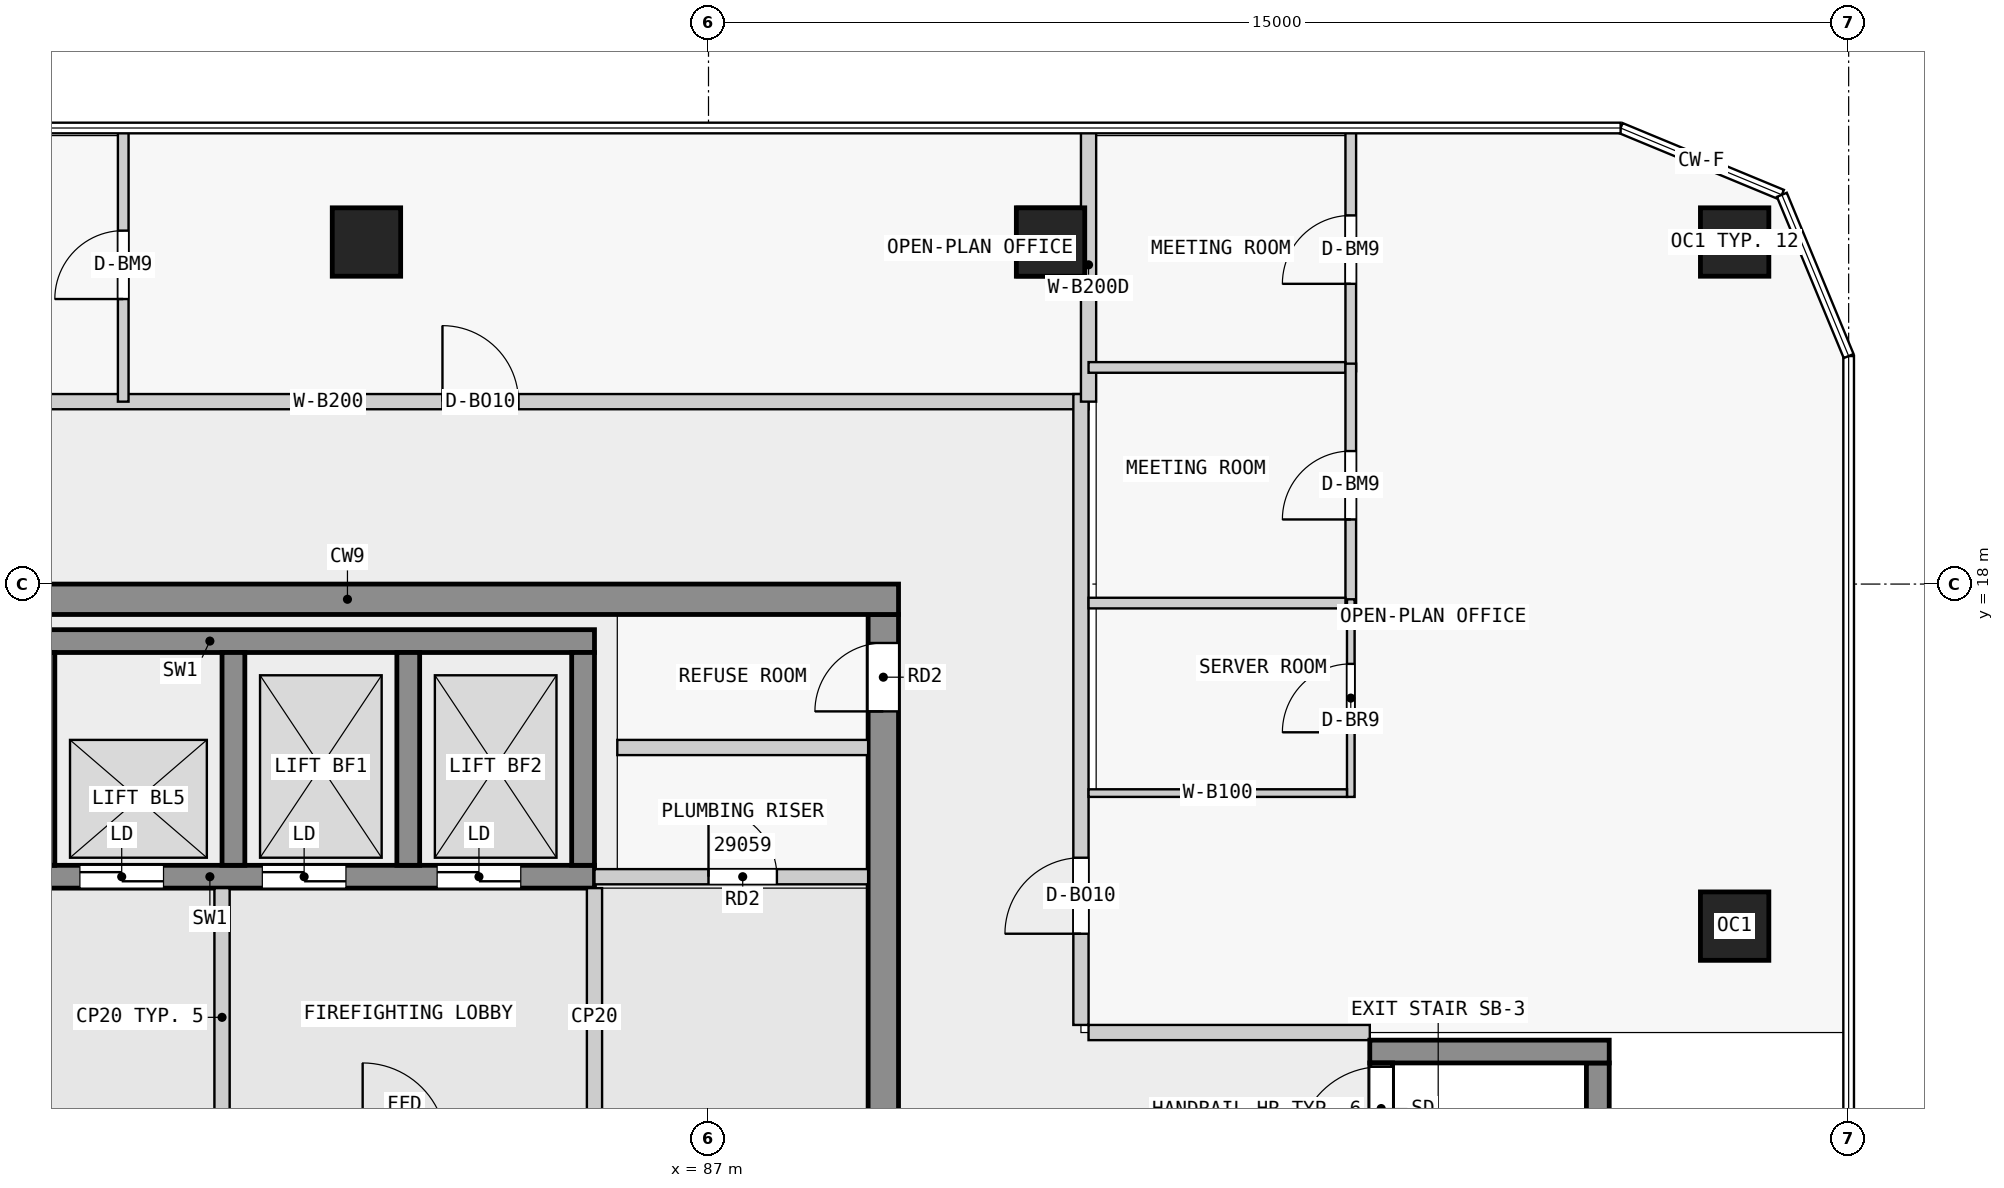
"""IFC4 building model, lengths in metres.
Left out: names, types, materials, properties, quantities, classifications, styles, units other than length and angle.
Written with IfcOpenShell. Run it as: python <this file> out.ifc"""

import sys

from ifc_helpers import new_model, si_unit, direction, frame, frame_2d, origin, origin_2d, place, context, subcontext, project, spatial, rectangle, extrude, element, fill, save


model = new_model("IFC4")
c1 = context("Model", 3, precision=1e-05, world=origin(), true_north=direction((0.0, 1.0)))
c2 = subcontext(c1, "Body", "Model", "MODEL_VIEW")
j1 = project(units=[si_unit("LENGTHUNIT", "METRE"), si_unit("PLANEANGLEUNIT", "RADIAN")], contexts=[c1])
p1 = place(None, origin())
s1 = spatial("IfcSite", under=j1, at=p1, CompositionType="ELEMENT")
p2 = place(p1, origin())
s2 = spatial("IfcBuilding", under=s1, at=p2, CompositionType="ELEMENT")
p3 = place(p2, frame((0.0, 0.0, 113.3)))
s3 = spatial("IfcBuildingStorey", under=s2, at=p3, CompositionType="ELEMENT", Elevation=113.3)
for number, where, z_axis, x_axis in (
    (1, (100.5, 13.5, 0.0), (0.0, 0.0, 1.0), (1.0, 0.0, 0.0)),
    (2, (100.5, 22.5, 0.0), (0.0, 0.0, 1.0), (1.0, 0.0, 0.0)),
    (3, (91.5, 22.5, 0.0), (0.0, 0.0, 1.0), (1.0, 0.0, 0.0)),
    (4, (82.5, 22.5, 0.0), (0.0, 0.0, 1.0), (1.0, 0.0, 0.0)),
):
    element("IfcColumn", number, at=place(p3, frame(where, z_axis=z_axis, x_axis=x_axis)), inside=s3, PredefinedType="COLUMN", context=c2, shape_type="SweptSolid", body=[
        extrude(rectangle(XDim=0.9, YDim=0.9, at=origin_2d()), origin(), (0.0, 0.0, 1.0), 3.5),
    ])
p4 = place(p3, frame((75.0, 17.8, 0.0), z_axis=(0.0, 0.0, 1.0), x_axis=(1.0, 0.0, 0.0)))
e5 = element("IfcWall", 5, at=p4, inside=s3, PredefinedType="SHEAR", context=c2, shape_type="SweptSolid", body=[
    extrude(rectangle(XDim=14.5, YDim=0.4, at=frame_2d((7.25, 0.0))), origin(), (0.0, 0.0, 1.0), 3.25),
])
p5 = place(p3, frame((89.3, 0.4, 0.0), z_axis=(0.0, 0.0, 1.0), x_axis=(0.0, 1.0, 0.0)))
e6 = element("IfcWall", 6, at=p5, inside=s3, PredefinedType="SHEAR", context=c2, shape_type="SweptSolid", body=[
    extrude(rectangle(XDim=17.2, YDim=0.4, at=frame_2d((8.6, 0.0))), origin(), (0.0, 0.0, 1.0), 3.25),
])
p6 = place(p5, frame((7.7, 0.0, 0.0)))
e7 = element("IfcOpeningElement", 7, at=p6, cuts=e6, PredefinedType="OPENING", context=c2, shape_type="SweptSolid", body=[
    extrude(rectangle(XDim=1.8, YDim=2.1, at=frame_2d((0.9, 1.05))), frame((0.0, 0.21, 0.0), z_axis=(0.0, -1.0, 0.0), x_axis=(1.0, 0.0, 0.0)), (0.0, 0.0, 1.0), 0.42),
])
p7 = place(p5, frame((15.925, 0.0, 0.0)))
e8 = element("IfcOpeningElement", 8, at=p7, cuts=e6, PredefinedType="OPENING", context=c2, shape_type="SweptSolid", body=[
    extrude(rectangle(XDim=0.9, YDim=2.1, at=frame_2d((0.45, 1.05))), frame((0.0, 0.21, 0.0), z_axis=(0.0, -1.0, 0.0), x_axis=(1.0, 0.0, 0.0)), (0.0, 0.0, 1.0), 0.42),
])
p8 = place(p3, frame((75.38, 17.25, 0.0), z_axis=(0.0, 0.0, 1.0), x_axis=(1.0, 0.0, 0.0)))
e9 = element("IfcWall", 9, at=p8, inside=s3, PredefinedType="SHEAR", context=c2, shape_type="SweptSolid", body=[
    extrude(rectangle(XDim=10.12, YDim=0.3, at=frame_2d((5.06, 0.0))), origin(), (0.0, 0.0, 1.0), 3.25),
])
p9 = place(p3, frame((75.38, 14.15, 0.0), z_axis=(0.0, 0.0, 1.0), x_axis=(1.0, 0.0, 0.0)))
e10 = element("IfcWall", 10, at=p9, inside=s3, PredefinedType="SHEAR", context=c2, shape_type="SweptSolid", body=[
    extrude(rectangle(XDim=10.12, YDim=0.3, at=frame_2d((5.06, 0.0))), origin(), (0.0, 0.0, 1.0), 3.25),
])
p10 = place(p9, frame((0.85, 0.0, 0.0)))
e11 = element("IfcOpeningElement", 11, at=p10, cuts=e10, PredefinedType="OPENING", context=c2, shape_type="SweptSolid", body=[
    extrude(rectangle(XDim=1.1, YDim=2.1, at=frame_2d((0.55, 1.05))), frame((0.0, 0.16, 0.0), z_axis=(0.0, -1.0, 0.0), x_axis=(1.0, 0.0, 0.0)), (0.0, 0.0, 1.0), 0.32),
])
p11 = place(p9, frame((3.35, 0.0, 0.0)))
e12 = element("IfcOpeningElement", 12, at=p11, cuts=e10, PredefinedType="OPENING", context=c2, shape_type="SweptSolid", body=[
    extrude(rectangle(XDim=1.1, YDim=2.1, at=frame_2d((0.55, 1.05))), frame((0.0, 0.16, 0.0), z_axis=(0.0, -1.0, 0.0), x_axis=(1.0, 0.0, 0.0)), (0.0, 0.0, 1.0), 0.32),
])
p12 = place(p9, frame((5.75, 0.0, 0.0)))
e13 = element("IfcOpeningElement", 13, at=p12, cuts=e10, PredefinedType="OPENING", context=c2, shape_type="SweptSolid", body=[
    extrude(rectangle(XDim=1.1, YDim=2.1, at=frame_2d((0.55, 1.05))), frame((0.0, 0.16, 0.0), z_axis=(0.0, -1.0, 0.0), x_axis=(1.0, 0.0, 0.0)), (0.0, 0.0, 1.0), 0.32),
])
p13 = place(p9, frame((8.05, 0.0, 0.0)))
e14 = element("IfcOpeningElement", 14, at=p13, cuts=e10, PredefinedType="OPENING", context=c2, shape_type="SweptSolid", body=[
    extrude(rectangle(XDim=1.1, YDim=2.1, at=frame_2d((0.55, 1.05))), frame((0.0, 0.16, 0.0), z_axis=(0.0, -1.0, 0.0), x_axis=(1.0, 0.0, 0.0)), (0.0, 0.0, 1.0), 0.32),
])
for number, where, z_axis, x_axis in (
    (15, (78.25, 14.3, 0.0), (0.0, 0.0, 1.0), (0.0, 1.0, 0.0)),
    (16, (80.75, 14.3, 0.0), (0.0, 0.0, 1.0), (0.0, 1.0, 0.0)),
    (17, (83.05, 14.3, 0.0), (0.0, 0.0, 1.0), (0.0, 1.0, 0.0)),
    (18, (85.35, 14.3, 0.0), (0.0, 0.0, 1.0), (0.0, 1.0, 0.0)),
):
    element("IfcWall", number, at=place(p3, frame(where, z_axis=z_axis, x_axis=x_axis)), inside=s3, PredefinedType="SHEAR", context=c2, shape_type="SweptSolid", body=[
        extrude(rectangle(XDim=2.8, YDim=0.3, at=frame_2d((1.4, 0.0))), origin(), (0.0, 0.0, 1.0), 3.25),
    ])
p14 = place(p3, frame((95.85, 5.3, 0.0), z_axis=(0.0, 0.0, 1.0), x_axis=(0.0, 1.0, 0.0)))
e19 = element("IfcWall", 19, at=p14, inside=s3, PredefinedType="SHEAR", context=c2, shape_type="SweptSolid", body=[
    extrude(rectangle(XDim=6.4, YDim=0.3, at=frame_2d((3.2, 0.0))), origin(), (0.0, 0.0, 1.0), 3.25),
])
p15 = place(p14, frame((5.25, 0.0, 0.0)))
e20 = element("IfcOpeningElement", 20, at=p15, cuts=e19, PredefinedType="OPENING", context=c2, shape_type="SweptSolid", body=[
    extrude(rectangle(XDim=1.1, YDim=2.1, at=frame_2d((0.55, 1.05))), frame((0.0, 0.16, 0.0), z_axis=(0.0, -1.0, 0.0), x_axis=(1.0, 0.0, 0.0)), (0.0, 0.0, 1.0), 0.32),
])
p16 = place(p3, frame((98.7, 5.3, 0.0), z_axis=(0.0, 0.0, 1.0), x_axis=(0.0, 1.0, 0.0)))
e21 = element("IfcWall", 21, at=p16, inside=s3, PredefinedType="SHEAR", context=c2, shape_type="SweptSolid", body=[
    extrude(rectangle(XDim=6.4, YDim=0.3, at=frame_2d((3.2, 0.0))), origin(), (0.0, 0.0, 1.0), 3.25),
])
p17 = place(p3, frame((95.7, 11.85, 0.0), z_axis=(0.0, 0.0, 1.0), x_axis=(1.0, 0.0, 0.0)))
e22 = element("IfcWall", 22, at=p17, inside=s3, PredefinedType="SHEAR", context=c2, shape_type="SweptSolid", body=[
    extrude(rectangle(XDim=3.15, YDim=0.3, at=frame_2d((1.575, 0.0))), origin(), (0.0, 0.0, 1.0), 3.25),
])
for number, where, z_axis, x_axis in (
    (23, (80.6, 10.6, 0.0), (0.0, 0.0, 1.0), (0.0, 1.0, 0.0)),
    (24, (85.5, 10.6, 0.0), (0.0, 0.0, 1.0), (0.0, 1.0, 0.0)),
):
    element("IfcWall", number, at=place(p3, frame(where, z_axis=z_axis, x_axis=x_axis)), inside=s3, PredefinedType="PARTITIONING", context=c2, shape_type="SweptSolid", body=[
        extrude(rectangle(XDim=3.4, YDim=0.2, at=frame_2d((1.7, 0.0))), origin(), (0.0, 0.0, 1.0), 3.25),
    ])
p18 = place(p3, frame((85.5, 14.15, 0.0), z_axis=(0.0, 0.0, 1.0), x_axis=(1.0, 0.0, 0.0)))
e25 = element("IfcWall", 25, at=p18, inside=s3, PredefinedType="PARTITIONING", context=c2, shape_type="SweptSolid", body=[
    extrude(rectangle(XDim=3.6, YDim=0.2, at=frame_2d((1.8, 0.0))), origin(), (0.0, 0.0, 1.0), 3.25),
])
p19 = place(p18, frame((1.5, 0.0, 0.0)))
e26 = element("IfcOpeningElement", 26, at=p19, cuts=e25, PredefinedType="OPENING", context=c2, shape_type="SweptSolid", body=[
    extrude(rectangle(XDim=0.9, YDim=2.1, at=frame_2d((0.45, 1.05))), frame((0.0, 0.11, 0.0), z_axis=(0.0, -1.0, 0.0), x_axis=(1.0, 0.0, 0.0)), (0.0, 0.0, 1.0), 0.22),
])
p20 = place(p3, frame((85.8, 15.85, 0.0), z_axis=(0.0, 0.0, 1.0), x_axis=(1.0, 0.0, 0.0)))
e27 = element("IfcWall", 27, at=p20, inside=s3, PredefinedType="PARTITIONING", context=c2, shape_type="SweptSolid", body=[
    extrude(rectangle(XDim=3.3, YDim=0.2, at=frame_2d((1.65, 0.0))), origin(), (0.0, 0.0, 1.0), 3.25),
])
p21 = place(p3, frame((72.0, 20.4, 0.0), z_axis=(0.0, 0.0, 1.0), x_axis=(1.0, 0.0, 0.0)))
e28 = element("IfcWall", 28, at=p21, inside=s3, PredefinedType="PARTITIONING", context=c2, shape_type="SweptSolid", body=[
    extrude(rectangle(XDim=20.0, YDim=0.2, at=frame_2d((10.0, 0.0))), origin(), (0.0, 0.0, 1.0), 3.25),
])
p22 = place(p21, frame((11.5, 0.0, 0.0)))
e29 = element("IfcOpeningElement", 29, at=p22, cuts=e28, PredefinedType="OPENING", context=c2, shape_type="SweptSolid", body=[
    extrude(rectangle(XDim=1.0, YDim=2.4, at=frame_2d((0.5, 1.2))), frame((0.0, 0.11, 0.0), z_axis=(0.0, -1.0, 0.0), x_axis=(1.0, 0.0, 0.0)), (0.0, 0.0, 1.0), 0.22),
])
p23 = place(p3, frame((91.9, 12.2, 0.0), z_axis=(0.0, 0.0, 1.0), x_axis=(0.0, 1.0, 0.0)))
e30 = element("IfcWall", 30, at=p23, inside=s3, PredefinedType="PARTITIONING", context=c2, shape_type="SweptSolid", body=[
    extrude(rectangle(XDim=8.3, YDim=0.2, at=frame_2d((4.15, 0.0))), origin(), (0.0, 0.0, 1.0), 3.25),
])
p24 = place(p23, frame((1.2, 0.0, 0.0)))
e31 = element("IfcOpeningElement", 31, at=p24, cuts=e30, PredefinedType="OPENING", context=c2, shape_type="SweptSolid", body=[
    extrude(rectangle(XDim=1.0, YDim=2.4, at=frame_2d((0.5, 1.2))), frame((0.0, 0.11, 0.0), z_axis=(0.0, -1.0, 0.0), x_axis=(1.0, 0.0, 0.0)), (0.0, 0.0, 1.0), 0.22),
])
p25 = place(p3, frame((92.0, 12.1, 0.0), z_axis=(0.0, 0.0, 1.0), x_axis=(1.0, 0.0, 0.0)))
e32 = element("IfcWall", 32, at=p25, inside=s3, PredefinedType="PARTITIONING", context=c2, shape_type="SweptSolid", body=[
    extrude(rectangle(XDim=3.7, YDim=0.2, at=frame_2d((1.85, 0.0))), origin(), (0.0, 0.0, 1.0), 3.2),
])
p26 = place(p3, frame((92.0, 20.4, 0.0), z_axis=(0.0, 0.0, 1.0), x_axis=(0.0, 1.0, 0.0)))
e33 = element("IfcWall", 33, at=p26, inside=s3, PredefinedType="PARTITIONING", context=c2, shape_type="SweptSolid", body=[
    extrude(rectangle(XDim=3.6, YDim=0.2, at=frame_2d((1.8, 0.0))), origin(), (0.0, 0.0, 1.0), 3.25),
])
p27 = place(p3, frame((95.45, 20.8, 0.0), z_axis=(0.0, 0.0, 1.0), x_axis=(0.0, 1.0, 0.0)))
e34 = element("IfcWall", 34, at=p27, inside=s3, PredefinedType="PARTITIONING", context=c2, shape_type="SweptSolid", body=[
    extrude(rectangle(XDim=3.2, YDim=0.14, at=frame_2d((1.6, 0.0))), origin(), (0.0, 0.0, 1.0), 3.2),
])
p28 = place(p27, frame((1.15, 0.0, 0.0)))
e35 = element("IfcOpeningElement", 35, at=p28, cuts=e34, PredefinedType="OPENING", context=c2, shape_type="SweptSolid", body=[
    extrude(rectangle(XDim=0.9, YDim=2.4, at=frame_2d((0.45, 1.2))), frame((0.0, 0.08, 0.0), z_axis=(0.0, -1.0, 0.0), x_axis=(1.0, 0.0, 0.0)), (0.0, 0.0, 1.0), 0.16),
])
p29 = place(p3, frame((92.0, 20.85, 0.0), z_axis=(0.0, 0.0, 1.0), x_axis=(1.0, 0.0, 0.0)))
e36 = element("IfcWall", 36, at=p29, inside=s3, PredefinedType="PARTITIONING", context=c2, shape_type="SweptSolid", body=[
    extrude(rectangle(XDim=3.38, YDim=0.14, at=frame_2d((1.69, 0.0))), origin(), (0.0, 0.0, 1.0), 3.2),
])
p30 = place(p3, frame((95.45, 17.7, 0.0), z_axis=(0.0, 0.0, 1.0), x_axis=(0.0, 1.0, 0.0)))
e37 = element("IfcWall", 37, at=p30, inside=s3, PredefinedType="PARTITIONING", context=c2, shape_type="SweptSolid", body=[
    extrude(rectangle(XDim=3.2, YDim=0.14, at=frame_2d((1.6, 0.0))), origin(), (0.0, 0.0, 1.0), 3.2),
])
p31 = place(p30, frame((1.15, 0.0, 0.0)))
e38 = element("IfcOpeningElement", 38, at=p31, cuts=e37, PredefinedType="OPENING", context=c2, shape_type="SweptSolid", body=[
    extrude(rectangle(XDim=0.9, YDim=2.4, at=frame_2d((0.45, 1.2))), frame((0.0, 0.08, 0.0), z_axis=(0.0, -1.0, 0.0), x_axis=(1.0, 0.0, 0.0)), (0.0, 0.0, 1.0), 0.16),
])
p32 = place(p3, frame((92.0, 17.75, 0.0), z_axis=(0.0, 0.0, 1.0), x_axis=(1.0, 0.0, 0.0)))
e39 = element("IfcWall", 39, at=p32, inside=s3, PredefinedType="PARTITIONING", context=c2, shape_type="SweptSolid", body=[
    extrude(rectangle(XDim=3.38, YDim=0.14, at=frame_2d((1.69, 0.0))), origin(), (0.0, 0.0, 1.0), 3.2),
])
p33 = place(p3, frame((95.45, 15.2, 0.0), z_axis=(0.0, 0.0, 1.0), x_axis=(0.0, 1.0, 0.0)))
e40 = element("IfcWall", 40, at=p33, inside=s3, PredefinedType="PARTITIONING", context=c2, shape_type="SweptSolid", body=[
    extrude(rectangle(XDim=2.6, YDim=0.1, at=frame_2d((1.3, 0.0))), origin(), (0.0, 0.0, 1.0), 3.2),
])
p34 = place(p33, frame((0.85, 0.0, 0.0)))
e41 = element("IfcOpeningElement", 41, at=p34, cuts=e40, PredefinedType="OPENING", context=c2, shape_type="SweptSolid", body=[
    extrude(rectangle(XDim=0.9, YDim=2.1, at=frame_2d((0.45, 1.05))), frame((0.0, 0.06, 0.0), z_axis=(0.0, -1.0, 0.0), x_axis=(1.0, 0.0, 0.0)), (0.0, 0.0, 1.0), 0.12),
])
p35 = place(p3, frame((92.0, 15.25, 0.0), z_axis=(0.0, 0.0, 1.0), x_axis=(1.0, 0.0, 0.0)))
e42 = element("IfcWall", 42, at=p35, inside=s3, PredefinedType="PARTITIONING", context=c2, shape_type="SweptSolid", body=[
    extrude(rectangle(XDim=3.4, YDim=0.1, at=frame_2d((1.7, 0.0))), origin(), (0.0, 0.0, 1.0), 3.2),
])
p36 = place(p3, frame((79.3, 20.4, 0.0), z_axis=(0.0, 0.0, 1.0), x_axis=(0.0, 1.0, 0.0)))
e43 = element("IfcWall", 43, at=p36, inside=s3, PredefinedType="PARTITIONING", context=c2, shape_type="SweptSolid", body=[
    extrude(rectangle(XDim=3.6, YDim=0.14, at=frame_2d((1.8, 0.0))), origin(), (0.0, 0.0, 1.0), 3.25),
])
p37 = place(p36, frame((1.35, 0.0, 0.0)))
e44 = element("IfcOpeningElement", 44, at=p37, cuts=e43, PredefinedType="OPENING", context=c2, shape_type="SweptSolid", body=[
    extrude(rectangle(XDim=0.9, YDim=2.4, at=frame_2d((0.45, 1.2))), frame((0.0, 0.08, 0.0), z_axis=(0.0, -1.0, 0.0), x_axis=(1.0, 0.0, 0.0)), (0.0, 0.0, 1.0), 0.16),
])
p38 = place(p11, origin())
e45 = element("IfcDoor", 45, at=p38, inside=s3, OperationType="DOUBLE_DOOR_SLIDING", PredefinedType="DOOR", context=c2, shape_type="SweptSolid", body=[
    extrude(rectangle(XDim=1.1, YDim=2.1, at=frame_2d((0.55, 1.05))), frame((0.0, 0.025, 0.0), z_axis=(0.0, -1.0, 0.0), x_axis=(1.0, 0.0, 0.0)), (0.0, 0.0, 1.0), 0.05),
])
fill(e12, e45)
p39 = place(p12, origin())
e46 = element("IfcDoor", 46, at=p39, inside=s3, OperationType="DOUBLE_DOOR_SLIDING", PredefinedType="DOOR", context=c2, shape_type="SweptSolid", body=[
    extrude(rectangle(XDim=1.1, YDim=2.1, at=frame_2d((0.55, 1.05))), frame((0.0, 0.025, 0.0), z_axis=(0.0, -1.0, 0.0), x_axis=(1.0, 0.0, 0.0)), (0.0, 0.0, 1.0), 0.05),
])
fill(e13, e46)
p40 = place(p13, origin())
e47 = element("IfcDoor", 47, at=p40, inside=s3, OperationType="DOUBLE_DOOR_SLIDING", PredefinedType="DOOR", context=c2, shape_type="SweptSolid", body=[
    extrude(rectangle(XDim=1.1, YDim=2.1, at=frame_2d((0.55, 1.05))), frame((0.0, 0.025, 0.0), z_axis=(0.0, -1.0, 0.0), x_axis=(1.0, 0.0, 0.0)), (0.0, 0.0, 1.0), 0.05),
])
fill(e14, e47)
p41 = place(p15, origin())
e48 = element("IfcDoor", 48, at=p41, inside=s3, OperationType="SINGLE_SWING_LEFT", PredefinedType="DOOR", context=c2, shape_type="SweptSolid", body=[
    extrude(rectangle(XDim=1.1, YDim=2.1, at=frame_2d((0.55, 1.05))), frame((0.0, 0.025, 0.0), z_axis=(0.0, -1.0, 0.0), x_axis=(1.0, 0.0, 0.0)), (0.0, 0.0, 1.0), 0.05),
])
fill(e20, e48)
p42 = place(p19, origin())
e49 = element("IfcDoor", 49, at=p42, inside=s3, OperationType="SINGLE_SWING_LEFT", PredefinedType="DOOR", context=c2, shape_type="SweptSolid", body=[
    extrude(rectangle(XDim=0.9, YDim=2.1, at=frame_2d((0.45, 1.05))), frame((0.0, 0.025, 0.0), z_axis=(0.0, -1.0, 0.0), x_axis=(1.0, 0.0, 0.0)), (0.0, 0.0, 1.0), 0.05),
])
fill(e26, e49)
p43 = place(p7, origin())
e50 = element("IfcDoor", 50, at=p43, inside=s3, OperationType="SINGLE_SWING_LEFT", PredefinedType="DOOR", context=c2, shape_type="SweptSolid", body=[
    extrude(rectangle(XDim=0.9, YDim=2.1, at=frame_2d((0.45, 1.05))), frame((0.0, 0.025, 0.0), z_axis=(0.0, -1.0, 0.0), x_axis=(1.0, 0.0, 0.0)), (0.0, 0.0, 1.0), 0.05),
])
fill(e8, e50)
p44 = place(p24, origin())
e51 = element("IfcDoor", 51, at=p44, inside=s3, OperationType="SINGLE_SWING_LEFT", PredefinedType="DOOR", context=c2, shape_type="SweptSolid", body=[
    extrude(rectangle(XDim=1.0, YDim=2.4, at=frame_2d((0.5, 1.2))), frame((0.0, 0.025, 0.0), z_axis=(0.0, -1.0, 0.0), x_axis=(1.0, 0.0, 0.0)), (0.0, 0.0, 1.0), 0.05),
])
fill(e31, e51)
p45 = place(p22, origin())
e52 = element("IfcDoor", 52, at=p45, inside=s3, OperationType="SINGLE_SWING_LEFT", PredefinedType="DOOR", context=c2, shape_type="SweptSolid", body=[
    extrude(rectangle(XDim=1.0, YDim=2.4, at=frame_2d((0.5, 1.2))), frame((0.0, 0.025, 0.0), z_axis=(0.0, -1.0, 0.0), x_axis=(1.0, 0.0, 0.0)), (0.0, 0.0, 1.0), 0.05),
])
fill(e29, e52)
p46 = place(p28, origin())
e53 = element("IfcDoor", 53, at=p46, inside=s3, OperationType="SINGLE_SWING_LEFT", PredefinedType="DOOR", context=c2, shape_type="SweptSolid", body=[
    extrude(rectangle(XDim=0.9, YDim=2.4, at=frame_2d((0.45, 1.2))), frame((0.0, 0.025, 0.0), z_axis=(0.0, -1.0, 0.0), x_axis=(1.0, 0.0, 0.0)), (0.0, 0.0, 1.0), 0.05),
])
fill(e35, e53)
p47 = place(p31, origin())
e54 = element("IfcDoor", 54, at=p47, inside=s3, OperationType="SINGLE_SWING_LEFT", PredefinedType="DOOR", context=c2, shape_type="SweptSolid", body=[
    extrude(rectangle(XDim=0.9, YDim=2.4, at=frame_2d((0.45, 1.2))), frame((0.0, 0.025, 0.0), z_axis=(0.0, -1.0, 0.0), x_axis=(1.0, 0.0, 0.0)), (0.0, 0.0, 1.0), 0.05),
])
fill(e38, e54)
p48 = place(p34, origin())
e55 = element("IfcDoor", 55, at=p48, inside=s3, OperationType="SINGLE_SWING_LEFT", PredefinedType="DOOR", context=c2, shape_type="SweptSolid", body=[
    extrude(rectangle(XDim=0.9, YDim=2.1, at=frame_2d((0.45, 1.05))), frame((0.0, 0.025, 0.0), z_axis=(0.0, -1.0, 0.0), x_axis=(1.0, 0.0, 0.0)), (0.0, 0.0, 1.0), 0.05),
])
fill(e41, e55)
p49 = place(p37, origin())
e56 = element("IfcDoor", 56, at=p49, inside=s3, OperationType="SINGLE_SWING_LEFT", PredefinedType="DOOR", context=c2, shape_type="SweptSolid", body=[
    extrude(rectangle(XDim=0.9, YDim=2.4, at=frame_2d((0.45, 1.2))), frame((0.0, 0.025, 0.0), z_axis=(0.0, -1.0, 0.0), x_axis=(1.0, 0.0, 0.0)), (0.0, 0.0, 1.0), 0.05),
])
fill(e44, e56)
save(model, sys.argv[1])
